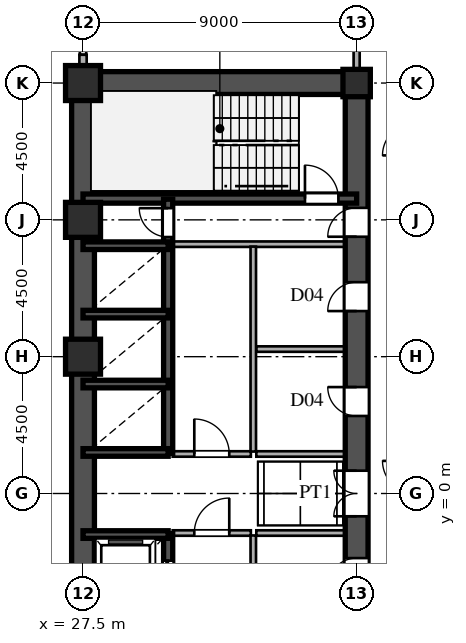
"""IFC4 building model, lengths in metres.
Left out: names, types, materials, properties, quantities, classifications, styles, units other than length and angle.
Written with IfcOpenShell. Run it as: python <this file> out.ifc"""

import sys

from ifc_helpers import new_model, si_unit, direction, frame, frame_2d, origin, origin_2d, place, context, subcontext, project, spatial, rectangle, hollow_rectangle, i_section, extrude, source, transform, mapped, element, fill, save


model = new_model("IFC4")
c1 = context("Model", 3, precision=1e-05, world=origin(), true_north=direction((0.0, 1.0)))
c2 = subcontext(c1, "Body", "Model", "MODEL_VIEW")
j1 = project(units=[si_unit("LENGTHUNIT", "METRE"), si_unit("PLANEANGLEUNIT", "RADIAN")], contexts=[c1])
p1 = place(None, origin())
s1 = spatial("IfcSite", under=j1, at=p1, CompositionType="ELEMENT")
p2 = place(p1, origin())
s2 = spatial("IfcBuilding", under=s1, at=p2, CompositionType="ELEMENT")
p3 = place(p2, frame((0.0, 0.0, 26.1)))
s3 = spatial("IfcBuildingStorey", under=s2, at=p3, CompositionType="ELEMENT", Elevation=26.1)
m1 = source(origin(), c2, "Body", "SweptSolid", [
    extrude(hollow_rectangle(XDim=1.15, YDim=1.15, WallThickness=0.048, at=origin_2d()), origin(), (0.0, 0.0, 1.0), 3.6),
])
for number, where, z_axis, x_axis in (
    (1, (27.5, 4.5, 0.0), (0.0, 0.0, 1.0), (1.0, 0.0, 0.0)),
    (2, (27.5, 9.0, 0.0), (0.0, 0.0, 1.0), (1.0, 0.0, 0.0)),
    (3, (27.5, 13.5, 0.0), (0.0, 0.0, 1.0), (1.0, 0.0, 0.0)),
):
    element("IfcColumn", number, at=place(p3, frame(where, z_axis=z_axis, x_axis=x_axis)), inside=s3, PredefinedType="COLUMN", context=c2, shape_type="MappedRepresentation", body=[
        mapped(m1, transform((0.0, 0.0, 0.0), scale=1.0)),
    ])
m2 = source(origin(), c2, "Body", "SweptSolid", [
    extrude(i_section(OverallWidth=0.9, OverallDepth=0.9, WebThickness=0.036, FlangeThickness=0.055, at=origin_2d()), origin(), (0.0, 0.0, 1.0), 3.6),
])
p4 = place(p3, frame((36.5, 13.5, 0.0), z_axis=(0.0, 0.0, 1.0), x_axis=(1.0, 0.0, 0.0)))
e4 = element("IfcColumn", 4, at=p4, inside=s3, PredefinedType="COLUMN", context=c2, shape_type="MappedRepresentation", body=[
    mapped(m2, transform((0.0, 0.0, 0.0), scale=1.0)),
])
p5 = place(p3, frame((27.5, 13.88, 0.0), z_axis=(0.0, 0.0, 1.0), x_axis=(0.0, 1.0, 0.0)))
e5 = element("IfcWall", 5, at=p5, inside=s3, PredefinedType="SOLIDWALL", context=c2, shape_type="SweptSolid", body=[
    extrude(rectangle(XDim=0.55, YDim=0.24, at=frame_2d((0.275, 0.0))), origin(), (0.0, 0.0, 1.0), 2.88),
])
for number, where, z_axis, x_axis in (
    (6, (27.5, -13.5, 0.0), (0.0, 0.0, 1.0), (0.0, 1.0, 0.0)),
    (7, (27.5, 1.3, 0.0), (0.0, 0.0, 1.0), (0.0, 1.0, 0.0)),
):
    element("IfcWall", number, at=place(p3, frame(where, z_axis=z_axis, x_axis=x_axis)), inside=s3, PredefinedType="SHEAR", context=c2, shape_type="SweptSolid", body=[
        extrude(rectangle(XDim=12.2, YDim=0.75, at=frame_2d((6.1, 0.0))), origin(), (0.0, 0.0, 1.0), 3.38),
    ])
p6 = place(p3, frame((27.5, -1.3, 0.0), z_axis=(0.0, 0.0, 1.0), x_axis=(0.0, 1.0, 0.0)))
e8 = element("IfcWall", 8, at=p6, inside=s3, PredefinedType="SHEAR", context=c2, shape_type="SweptSolid", body=[
    extrude(rectangle(XDim=2.6, YDim=0.75, at=frame_2d((1.3, 0.0))), origin(), (0.0, 0.0, 1.0), 3.38),
])
p7 = place(p3, frame((27.5, 13.5, 0.0), z_axis=(0.0, 0.0, 1.0), x_axis=(1.0, 0.0, 0.0)))
e9 = element("IfcWall", 9, at=p7, inside=s3, PredefinedType="SHEAR", context=c2, shape_type="SweptSolid", body=[
    extrude(rectangle(XDim=9.0, YDim=0.75, at=frame_2d((4.5, 0.0))), origin(), (0.0, 0.0, 1.0), 3.38),
])
p8 = place(p3, frame((36.5, -1.3, 0.0), z_axis=(0.0, 0.0, 1.0), x_axis=(0.0, 1.0, 0.0)))
e10 = element("IfcWall", 10, at=p8, inside=s3, PredefinedType="SHEAR", context=c2, shape_type="SweptSolid", body=[
    extrude(rectangle(XDim=2.6, YDim=0.75, at=frame_2d((1.3, 0.0))), origin(), (0.0, 0.0, 1.0), 3.38),
])
p9 = place(p8, frame((0.55, 0.0, 0.0)))
e11 = element("IfcOpeningElement", 11, at=p9, cuts=e10, PredefinedType="OPENING", context=c2, shape_type="SweptSolid", body=[
    extrude(rectangle(XDim=1.5, YDim=2.3, at=frame_2d((0.75, 1.15))), frame((0.0, 0.385, 0.0), z_axis=(0.0, -1.0, 0.0), x_axis=(1.0, 0.0, 0.0)), (0.0, 0.0, 1.0), 0.77),
])
p10 = place(p3, frame((36.5, 8.2, 0.0), z_axis=(0.0, 0.0, 1.0), x_axis=(0.0, 1.0, 0.0)))
e12 = element("IfcWall", 12, at=p10, inside=s3, PredefinedType="SHEAR", context=c2, shape_type="SweptSolid", body=[
    extrude(rectangle(XDim=5.45, YDim=0.75, at=frame_2d((2.725, 0.0))), origin(), (0.0, 0.0, 1.0), 3.38),
])
p11 = place(p10, frame((0.245, 0.0, 0.0)))
e13 = element("IfcOpeningElement", 13, at=p11, cuts=e12, PredefinedType="OPENING", context=c2, shape_type="SweptSolid", body=[
    extrude(rectangle(XDim=0.95, YDim=2.15, at=frame_2d((0.475, 1.075))), frame((0.0, 0.385, 0.0), z_axis=(0.0, -1.0, 0.0), x_axis=(1.0, 0.0, 0.0)), (0.0, 0.0, 1.0), 0.77),
])
p12 = place(p3, frame((36.5, -3.9, 0.0), z_axis=(0.0, 0.0, 1.0), x_axis=(0.0, 1.0, 0.0)))
e14 = element("IfcWall", 14, at=p12, inside=s3, PredefinedType="SHEAR", context=c2, shape_type="SweptSolid", body=[
    extrude(rectangle(XDim=2.6, YDim=0.75, at=frame_2d((1.3, 0.0))), origin(), (0.0, 0.0, 1.0), 3.38),
])
p13 = place(p12, frame((0.825, 0.0, 0.0)))
e15 = element("IfcOpeningElement", 15, at=p13, cuts=e14, PredefinedType="OPENING", context=c2, shape_type="SweptSolid", body=[
    extrude(rectangle(XDim=0.95, YDim=2.15, at=frame_2d((0.475, 1.075))), frame((0.0, 0.385, 0.0), z_axis=(0.0, -1.0, 0.0), x_axis=(1.0, 0.0, 0.0)), (0.0, 0.0, 1.0), 0.77),
])
p14 = place(p3, frame((36.5, 1.3, 0.0), z_axis=(0.0, 0.0, 1.0), x_axis=(0.0, 1.0, 0.0)))
e16 = element("IfcWall", 16, at=p14, inside=s3, PredefinedType="SHEAR", context=c2, shape_type="SweptSolid", body=[
    extrude(rectangle(XDim=3.45, YDim=0.75, at=frame_2d((1.725, 0.0))), origin(), (0.0, 0.0, 1.0), 3.38),
])
p15 = place(p14, frame((1.25, 0.0, 0.0)))
e17 = element("IfcOpeningElement", 17, at=p15, cuts=e16, PredefinedType="OPENING", context=c2, shape_type="SweptSolid", body=[
    extrude(rectangle(XDim=0.95, YDim=2.15, at=frame_2d((0.475, 1.075))), frame((0.0, 0.385, 0.0), z_axis=(0.0, -1.0, 0.0), x_axis=(1.0, 0.0, 0.0)), (0.0, 0.0, 1.0), 0.77),
])
p16 = place(p3, frame((36.5, 4.75, 0.0), z_axis=(0.0, 0.0, 1.0), x_axis=(0.0, 1.0, 0.0)))
e18 = element("IfcWall", 18, at=p16, inside=s3, PredefinedType="SHEAR", context=c2, shape_type="SweptSolid", body=[
    extrude(rectangle(XDim=3.45, YDim=0.75, at=frame_2d((1.725, 0.0))), origin(), (0.0, 0.0, 1.0), 3.38),
])
p17 = place(p16, frame((1.25, 0.0, 0.0)))
e19 = element("IfcOpeningElement", 19, at=p17, cuts=e18, PredefinedType="OPENING", context=c2, shape_type="SweptSolid", body=[
    extrude(rectangle(XDim=0.95, YDim=2.15, at=frame_2d((0.475, 1.075))), frame((0.0, 0.385, 0.0), z_axis=(0.0, -1.0, 0.0), x_axis=(1.0, 0.0, 0.0)), (0.0, 0.0, 1.0), 0.77),
])
p18 = place(p3, frame((27.5, 9.7, 0.0), z_axis=(0.0, 0.0, 1.0), x_axis=(1.0, 0.0, 0.0)))
e20 = element("IfcWall", 20, at=p18, inside=s3, PredefinedType="SHEAR", context=c2, shape_type="SweptSolid", body=[
    extrude(rectangle(XDim=9.0, YDim=0.3, at=frame_2d((4.5, 0.0))), origin(), (0.0, 0.0, 1.0), 3.38),
])
p19 = place(p18, frame((7.3, 0.0, 0.0)))
e21 = element("IfcOpeningElement", 21, at=p19, cuts=e20, PredefinedType="OPENING", context=c2, shape_type="SweptSolid", body=[
    extrude(rectangle(XDim=1.1, YDim=2.2, at=frame_2d((0.55, 1.1))), frame((0.0, 0.16, 0.0), z_axis=(0.0, -1.0, 0.0), x_axis=(1.0, 0.0, 0.0)), (0.0, 0.0, 1.0), 0.32),
])
for number, where, z_axis, x_axis in (
    (22, (27.5, -1.35, 0.0), (0.0, 0.0, 1.0), (1.0, 0.0, 0.0)),
    (23, (27.5, 1.35, 0.0), (0.0, 0.0, 1.0), (1.0, 0.0, 0.0)),
    (24, (27.5, 3.6, 0.0), (0.0, 0.0, 1.0), (1.0, 0.0, 0.0)),
    (25, (27.5, 5.9, 0.0), (0.0, 0.0, 1.0), (1.0, 0.0, 0.0)),
    (26, (27.5, 8.15, 0.0), (0.0, 0.0, 1.0), (1.0, 0.0, 0.0)),
):
    element("IfcWall", number, at=place(p3, frame(where, z_axis=z_axis, x_axis=x_axis)), inside=s3, PredefinedType="SHEAR", context=c2, shape_type="SweptSolid", body=[
        extrude(rectangle(XDim=2.8, YDim=0.25, at=frame_2d((1.4, 0.0))), origin(), (0.0, 0.0, 1.0), 3.38),
    ])
p20 = place(p3, frame((30.3, -4.2, 0.0), z_axis=(0.0, 0.0, 1.0), x_axis=(0.0, 1.0, 0.0)))
e27 = element("IfcWall", 27, at=p20, inside=s3, PredefinedType="SHEAR", context=c2, shape_type="SweptSolid", body=[
    extrude(rectangle(XDim=2.88, YDim=0.3, at=frame_2d((1.44, 0.0))), origin(), (0.0, 0.0, 1.0), 3.38),
])
p21 = place(p20, frame((0.89, 0.0, 0.0)))
e28 = element("IfcOpeningElement", 28, at=p21, cuts=e27, PredefinedType="OPENING", context=c2, shape_type="SweptSolid", body=[
    extrude(rectangle(XDim=1.1, YDim=2.2, at=frame_2d((0.55, 1.1))), frame((0.0, 0.16, 0.0), z_axis=(0.0, -1.0, 0.0), x_axis=(1.0, 0.0, 0.0)), (0.0, 0.0, 1.0), 0.32),
])
p22 = place(p3, frame((30.3, 1.32, 0.0), z_axis=(0.0, 0.0, 1.0), x_axis=(0.0, 1.0, 0.0)))
e29 = element("IfcWall", 29, at=p22, inside=s3, PredefinedType="SHEAR", context=c2, shape_type="SweptSolid", body=[
    extrude(rectangle(XDim=2.28, YDim=0.3, at=frame_2d((1.14, 0.0))), origin(), (0.0, 0.0, 1.0), 3.38),
])
p23 = place(p3, frame((30.3, 3.6, 0.0), z_axis=(0.0, 0.0, 1.0), x_axis=(0.0, 1.0, 0.0)))
e30 = element("IfcWall", 30, at=p23, inside=s3, PredefinedType="SHEAR", context=c2, shape_type="SweptSolid", body=[
    extrude(rectangle(XDim=2.3, YDim=0.3, at=frame_2d((1.15, 0.0))), origin(), (0.0, 0.0, 1.0), 3.38),
])
p24 = place(p3, frame((30.3, 5.9, 0.0), z_axis=(0.0, 0.0, 1.0), x_axis=(0.0, 1.0, 0.0)))
e31 = element("IfcWall", 31, at=p24, inside=s3, PredefinedType="SHEAR", context=c2, shape_type="SweptSolid", body=[
    extrude(rectangle(XDim=2.25, YDim=0.3, at=frame_2d((1.125, 0.0))), origin(), (0.0, 0.0, 1.0), 3.38),
])
p25 = place(p3, frame((30.3, 8.15, 0.0), z_axis=(0.0, 0.0, 1.0), x_axis=(0.0, 1.0, 0.0)))
e32 = element("IfcWall", 32, at=p25, inside=s3, PredefinedType="SHEAR", context=c2, shape_type="SweptSolid", body=[
    extrude(rectangle(XDim=1.53, YDim=0.3, at=frame_2d((0.765, 0.0))), origin(), (0.0, 0.0, 1.0), 3.38),
])
p26 = place(p25, frame((0.285, 0.0, 0.0)))
e33 = element("IfcOpeningElement", 33, at=p26, cuts=e32, PredefinedType="OPENING", context=c2, shape_type="SweptSolid", body=[
    extrude(rectangle(XDim=0.95, YDim=2.15, at=frame_2d((0.475, 1.075))), frame((0.0, 0.16, 0.0), z_axis=(0.0, -1.0, 0.0), x_axis=(1.0, 0.0, 0.0)), (0.0, 0.0, 1.0), 0.32),
])
p27 = place(p3, frame((30.45, 8.2, 0.0), z_axis=(0.0, 0.0, 1.0), x_axis=(1.0, 0.0, 0.0)))
e34 = element("IfcWall", 34, at=p27, inside=s3, PredefinedType="PARTITIONING", context=c2, shape_type="SweptSolid", body=[
    extrude(rectangle(XDim=5.7, YDim=0.18, at=frame_2d((2.85, 0.0))), origin(), (0.0, 0.0, 1.0), 3.38),
])
p28 = place(p3, frame((33.1, -6.42, 0.0), z_axis=(0.0, 0.0, 1.0), x_axis=(0.0, 1.0, 0.0)))
e35 = element("IfcWall", 35, at=p28, inside=s3, PredefinedType="PARTITIONING", context=c2, shape_type="SweptSolid", body=[
    extrude(rectangle(XDim=5.04, YDim=0.18, at=frame_2d((2.52, 0.0))), origin(), (0.0, 0.0, 1.0), 3.38),
])
p29 = place(p3, frame((33.1, 1.38, 0.0), z_axis=(0.0, 0.0, 1.0), x_axis=(0.0, 1.0, 0.0)))
e36 = element("IfcWall", 36, at=p29, inside=s3, PredefinedType="PARTITIONING", context=c2, shape_type="SweptSolid", body=[
    extrude(rectangle(XDim=6.74, YDim=0.18, at=frame_2d((3.37, 0.0))), origin(), (0.0, 0.0, 1.0), 3.38),
])
p30 = place(p3, frame((30.45, -1.3, 0.0), z_axis=(0.0, 0.0, 1.0), x_axis=(1.0, 0.0, 0.0)))
e37 = element("IfcWall", 37, at=p30, inside=s3, PredefinedType="PARTITIONING", context=c2, shape_type="SweptSolid", body=[
    extrude(rectangle(XDim=2.57, YDim=0.18, at=frame_2d((1.285, 0.0))), origin(), (0.0, 0.0, 1.0), 3.38),
])
p31 = place(p30, frame((0.71, 0.0, 0.0)))
e38 = element("IfcOpeningElement", 38, at=p31, cuts=e37, PredefinedType="OPENING", context=c2, shape_type="SweptSolid", body=[
    extrude(rectangle(XDim=1.15, YDim=2.2, at=frame_2d((0.575, 1.1))), frame((0.0, 0.1, 0.0), z_axis=(0.0, -1.0, 0.0), x_axis=(1.0, 0.0, 0.0)), (0.0, 0.0, 1.0), 0.2),
])
p32 = place(p3, frame((30.45, 1.3, 0.0), z_axis=(0.0, 0.0, 1.0), x_axis=(1.0, 0.0, 0.0)))
e39 = element("IfcWall", 39, at=p32, inside=s3, PredefinedType="PARTITIONING", context=c2, shape_type="SweptSolid", body=[
    extrude(rectangle(XDim=2.57, YDim=0.18, at=frame_2d((1.285, 0.0))), origin(), (0.0, 0.0, 1.0), 3.38),
])
p33 = place(p32, frame((0.71, 0.0, 0.0)))
e40 = element("IfcOpeningElement", 40, at=p33, cuts=e39, PredefinedType="OPENING", context=c2, shape_type="SweptSolid", body=[
    extrude(rectangle(XDim=1.15, YDim=2.2, at=frame_2d((0.575, 1.1))), frame((0.0, 0.1, 0.0), z_axis=(0.0, -1.0, 0.0), x_axis=(1.0, 0.0, 0.0)), (0.0, 0.0, 1.0), 0.2),
])
for number, where, z_axis, x_axis in (
    (41, (33.2, -1.3, 0.0), (0.0, 0.0, 1.0), (1.0, 0.0, 0.0)),
    (42, (33.2, 1.3, 0.0), (0.0, 0.0, 1.0), (1.0, 0.0, 0.0)),
    (43, (33.2, 4.75, 0.0), (0.0, 0.0, 1.0), (1.0, 0.0, 0.0)),
):
    element("IfcWall", number, at=place(p3, frame(where, z_axis=z_axis, x_axis=x_axis)), inside=s3, PredefinedType="PARTITIONING", context=c2, shape_type="SweptSolid", body=[
        extrude(rectangle(XDim=2.95, YDim=0.18, at=frame_2d((1.475, 0.0))), origin(), (0.0, 0.0, 1.0), 3.38),
    ])
p34 = place(p3, frame((36.5, 13.88, 0.0), z_axis=(0.0, 0.0, 1.0), x_axis=(0.0, 1.0, 0.0)))
e44 = element("IfcWall", 44, at=p34, inside=s3, PredefinedType="PARTITIONING", context=c2, shape_type="SweptSolid", body=[
    extrude(rectangle(XDim=1.635, YDim=0.2, at=frame_2d((0.817, 0.0))), origin(), (0.0, 0.0, 1.0), 2.68),
])
m3 = source(origin(), c2, "Body", "SweptSolid", [
    extrude(rectangle(XDim=1.5, YDim=2.3, at=frame_2d((0.75, 1.15))), frame((0.0, 0.025, 0.0), z_axis=(0.0, -1.0, 0.0), x_axis=(1.0, 0.0, 0.0)), (0.0, 0.0, 1.0), 0.05),
])
p35 = place(p9, origin())
e45 = element("IfcDoor", 45, at=p35, inside=s3, OperationType="DOUBLE_SWING_LEFT", PredefinedType="DOOR", context=c2, shape_type="MappedRepresentation", body=[
    mapped(m3, transform((0.0, 0.0, 0.0), scale=1.0)),
])
fill(e11, e45)
m4 = source(origin(), c2, "Body", "SweptSolid", [
    extrude(rectangle(XDim=0.95, YDim=2.15, at=frame_2d((0.475, 1.075))), frame((0.0, 0.025, 0.0), z_axis=(0.0, -1.0, 0.0), x_axis=(1.0, 0.0, 0.0)), (0.0, 0.0, 1.0), 0.05),
])
p36 = place(p11, origin())
e46 = element("IfcDoor", 46, at=p36, inside=s3, OperationType="SINGLE_SWING_LEFT", PredefinedType="DOOR", context=c2, shape_type="MappedRepresentation", body=[
    mapped(m4, transform((0.0, 0.0, 0.0), scale=1.0)),
])
fill(e13, e46)
p37 = place(p13, origin())
e47 = element("IfcDoor", 47, at=p37, inside=s3, OperationType="SINGLE_SWING_LEFT", PredefinedType="DOOR", context=c2, shape_type="MappedRepresentation", body=[
    mapped(m4, transform((0.0, 0.0, 0.0), scale=1.0)),
])
fill(e15, e47)
p38 = place(p15, origin())
e48 = element("IfcDoor", 48, at=p38, inside=s3, OperationType="SINGLE_SWING_RIGHT", PredefinedType="DOOR", context=c2, shape_type="MappedRepresentation", body=[
    mapped(m4, transform((0.0, 0.0, 0.0), scale=1.0)),
])
fill(e17, e48)
p39 = place(p17, origin())
e49 = element("IfcDoor", 49, at=p39, inside=s3, OperationType="SINGLE_SWING_LEFT", PredefinedType="DOOR", context=c2, shape_type="MappedRepresentation", body=[
    mapped(m4, transform((0.0, 0.0, 0.0), scale=1.0)),
])
fill(e19, e49)
m5 = source(origin(), c2, "Body", "SweptSolid", [
    extrude(rectangle(XDim=1.1, YDim=2.2, at=frame_2d((0.55, 1.1))), frame((0.0, 0.025, 0.0), z_axis=(0.0, -1.0, 0.0), x_axis=(1.0, 0.0, 0.0)), (0.0, 0.0, 1.0), 0.05),
])
p40 = place(p19, origin())
e50 = element("IfcDoor", 50, at=p40, inside=s3, OperationType="SINGLE_SWING_LEFT", PredefinedType="DOOR", context=c2, shape_type="MappedRepresentation", body=[
    mapped(m5, transform((0.0, 0.0, 0.0), scale=1.0)),
])
fill(e21, e50)
m6 = source(origin(), c2, "Body", "SweptSolid", [
    extrude(rectangle(XDim=1.1, YDim=2.2, at=frame_2d((0.55, 1.1))), frame((0.0, 0.025, 0.0), z_axis=(0.0, -1.0, 0.0), x_axis=(1.0, 0.0, 0.0)), (0.0, 0.0, 1.0), 0.05),
])
p41 = place(p21, origin())
e51 = element("IfcDoor", 51, at=p41, inside=s3, OperationType="DOUBLE_DOOR_SLIDING", PredefinedType="DOOR", context=c2, shape_type="MappedRepresentation", body=[
    mapped(m6, transform((0.0, 0.0, 0.0), scale=1.0)),
])
fill(e28, e51)
p42 = place(p26, origin())
e52 = element("IfcDoor", 52, at=p42, inside=s3, OperationType="SINGLE_SWING_RIGHT", PredefinedType="DOOR", context=c2, shape_type="MappedRepresentation", body=[
    mapped(m4, transform((0.0, 0.0, 0.0), scale=1.0)),
])
fill(e33, e52)
m7 = source(origin(), c2, "Body", "SweptSolid", [
    extrude(rectangle(XDim=1.15, YDim=2.2, at=frame_2d((0.575, 1.1))), frame((0.0, 0.025, 0.0), z_axis=(0.0, -1.0, 0.0), x_axis=(1.0, 0.0, 0.0)), (0.0, 0.0, 1.0), 0.05),
])
p43 = place(p31, origin())
e53 = element("IfcDoor", 53, at=p43, inside=s3, OperationType="SINGLE_SWING_RIGHT", PredefinedType="DOOR", context=c2, shape_type="MappedRepresentation", body=[
    mapped(m7, transform((0.0, 0.0, 0.0), scale=1.0)),
])
fill(e38, e53)
p44 = place(p33, origin())
e54 = element("IfcDoor", 54, at=p44, inside=s3, OperationType="SINGLE_SWING_LEFT", PredefinedType="DOOR", context=c2, shape_type="MappedRepresentation", body=[
    mapped(m7, transform((0.0, 0.0, 0.0), scale=1.0)),
])
fill(e40, e54)
save(model, sys.argv[1])
